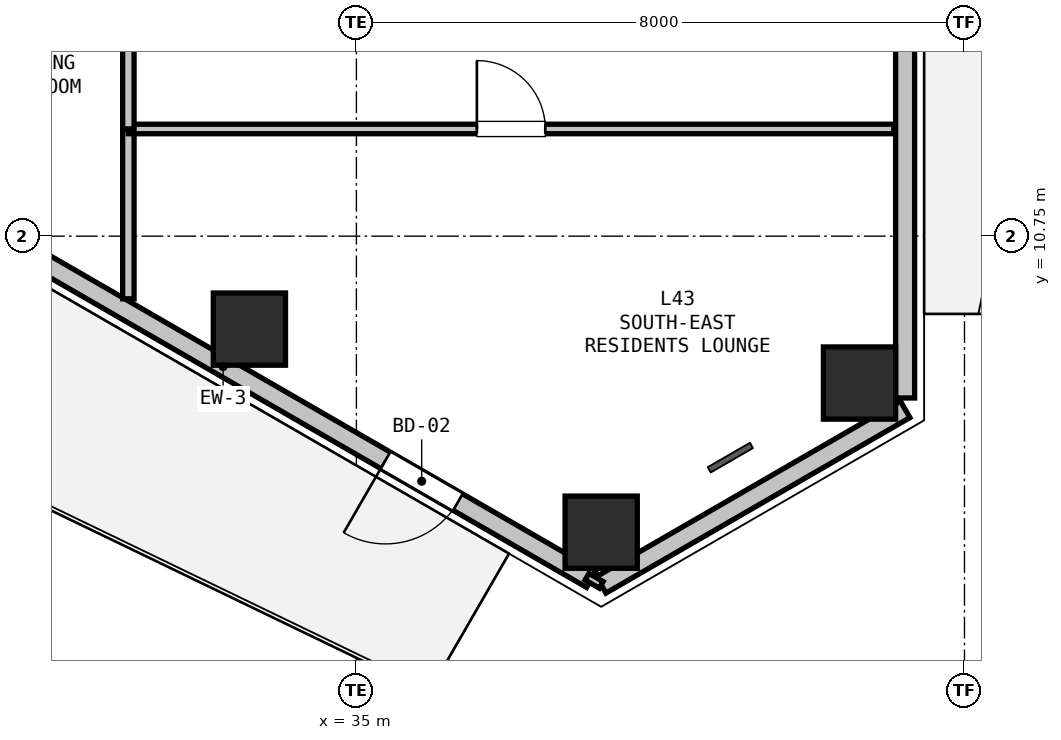
"""IFC4 building model, lengths in metres.
Left out: names, types, materials, properties, quantities, classifications, styles, units other than length and angle.
Written with IfcOpenShell. Run it as: python <this file> out.ifc"""

import sys

from ifc_helpers import new_model, si_unit, direction, frame, frame_2d, origin, origin_2d, place, context, subcontext, project, spatial, rectangle, hollow_rectangle, extrude, element, fill, save


model = new_model("IFC4")
c1 = context("Model", 3, precision=1e-05, world=origin(), true_north=direction((0.0, 1.0)))
c2 = subcontext(c1, "Body", "Model", "MODEL_VIEW")
j1 = project(units=[si_unit("LENGTHUNIT", "METRE"), si_unit("PLANEANGLEUNIT", "RADIAN")], contexts=[c1])
p1 = place(None, origin())
s1 = spatial("IfcSite", under=j1, at=p1, CompositionType="ELEMENT")
p2 = place(p1, origin())
s2 = spatial("IfcBuilding", under=s1, at=p2, CompositionType="ELEMENT")
p3 = place(p2, frame((0.0, 0.0, 154.2)))
s3 = spatial("IfcBuildingStorey", under=s2, at=p3, CompositionType="ELEMENT", Elevation=154.2)
for number, where, z_axis, x_axis in (
    (1, (41.619, 8.817, 0.0), (0.0, 0.0, 1.0), (1.0, 0.0, 0.0)),
    (2, (38.22, 6.855, 0.0), (0.0, 0.0, 1.0), (1.0, 0.0, 0.0)),
    (3, (33.593, 9.527, 0.0), (0.0, 0.0, 1.0), (1.0, 0.0, 0.0)),
):
    element("IfcColumn", number, at=place(p3, frame(where, z_axis=z_axis, x_axis=x_axis)), inside=s3, PredefinedType="COLUMN", context=c2, shape_type="SweptSolid", body=[
        extrude(hollow_rectangle(XDim=0.95, YDim=0.95, WallThickness=0.028, at=origin_2d()), origin(), (0.0, 0.0, 1.0), 3.3),
    ])
p4 = place(p3, frame((42.219, 8.471, 0.0), z_axis=(0.0, 0.0, 1.0), x_axis=(-0.866035021055, -0.499983342029, 0.0)))
e4 = element("IfcWall", 4, at=p4, inside=s3, PredefinedType="SOLIDWALL", context=c2, shape_type="SweptSolid", body=[
    extrude(rectangle(XDim=4.617, YDim=0.25, at=frame_2d((2.309, 0.0))), origin(), (0.0, 0.0, 1.0), 2.68),
])
p5 = place(p3, frame((42.219, 19.807, 0.0), z_axis=(0.0, 0.0, 1.0), x_axis=(0.0, -1.0, 0.0)))
e5 = element("IfcWall", 5, at=p5, inside=s3, PredefinedType="SOLIDWALL", context=c2, shape_type="SweptSolid", body=[
    extrude(rectangle(XDim=11.186, YDim=0.25, at=frame_2d((5.593, 0.0))), origin(), (0.0, 0.0, 1.0), 2.68),
])
p6 = place(p5, frame((2.796, 0.0, 0.9)))
e6 = element("IfcOpeningElement", 6, at=p6, cuts=e5, PredefinedType="OPENING", context=c2, shape_type="SweptSolid", body=[
    extrude(rectangle(XDim=1.2, YDim=1.5, at=frame_2d((0.6, 0.75))), frame((0.0, 0.135, 0.0), z_axis=(0.0, -1.0, 0.0), x_axis=(1.0, 0.0, 0.0)), (0.0, 0.0, 1.0), 0.27),
])
p7 = place(p3, frame((38.091, 6.237, 0.0), z_axis=(0.0, 0.0, 1.0), x_axis=(-0.86602239209, 0.500005216371, 0.0)))
e7 = element("IfcWall", 7, at=p7, inside=s3, PredefinedType="SOLIDWALL", context=c2, shape_type="SweptSolid", body=[
    extrude(rectangle(XDim=11.186, YDim=0.25, at=frame_2d((5.593, 0.0))), origin(), (0.0, 0.0, 1.0), 2.68),
])
p8 = place(p7, frame((2.027, 0.0, 0.0)))
e8 = element("IfcOpeningElement", 8, at=p8, cuts=e7, PredefinedType="OPENING", context=c2, shape_type="SweptSolid", body=[
    extrude(rectangle(XDim=1.1, YDim=2.1, at=frame_2d((0.55, 1.05))), frame((0.0, 0.135, 0.0), z_axis=(0.0, -1.0, 0.0), x_axis=(1.0, 0.0, 0.0)), (0.0, 0.0, 1.0), 0.27),
])
p9 = place(p7, frame((8.571, 0.0, 0.9)))
e9 = element("IfcOpeningElement", 9, at=p9, cuts=e7, PredefinedType="OPENING", context=c2, shape_type="SweptSolid", body=[
    extrude(rectangle(XDim=1.2, YDim=1.4, at=frame_2d((0.6, 0.7))), frame((0.0, 0.135, 0.0), z_axis=(0.0, -1.0, 0.0), x_axis=(1.0, 0.0, 0.0)), (0.0, 0.0, 1.0), 0.27),
])
p10 = place(p3, frame((32.0, 9.926, 0.0), z_axis=(0.0, 0.0, 1.0), x_axis=(0.0, 1.0, 0.0)))
e10 = element("IfcWall", 10, at=p10, inside=s3, PredefinedType="PARTITIONING", context=c2, shape_type="SweptSolid", body=[
    extrude(rectangle(XDim=2.234, YDim=0.15, at=frame_2d((1.117, 0.0))), origin(), (0.0, 0.0, 1.0), 2.365),
])
p11 = place(p3, frame((32.0, 12.16, 0.0), z_axis=(0.0, 0.0, 1.0), x_axis=(1.0, 0.0, 0.0)))
e11 = element("IfcWall", 11, at=p11, inside=s3, PredefinedType="PARTITIONING", context=c2, shape_type="SweptSolid", body=[
    extrude(rectangle(XDim=10.07, YDim=0.125, at=frame_2d((5.035, 0.0))), origin(), (0.0, 0.0, 1.0), 2.433),
])
p12 = place(p11, frame((4.585, 0.0, 0.0)))
e12 = element("IfcOpeningElement", 12, at=p12, cuts=e11, PredefinedType="OPENING", context=c2, shape_type="SweptSolid", body=[
    extrude(rectangle(XDim=0.9, YDim=2.1, at=frame_2d((0.45, 1.05))), frame((0.0, 0.073, 0.0), z_axis=(0.0, -1.0, 0.0), x_axis=(1.0, 0.0, 0.0)), (0.0, 0.0, 1.0), 0.145),
])
p13 = place(p3, frame((38.221, 6.162, 0.0), z_axis=(0.0, 0.0, 1.0), x_axis=(-0.865581379588, 0.500768285049, 0.0)))
e13 = element("IfcWall", 13, at=p13, inside=s3, PredefinedType="PARTITIONING", context=c2, shape_type="SweptSolid", body=[
    extrude(rectangle(XDim=0.216, YDim=0.1, at=frame_2d((0.108, 0.0))), origin(), (0.0, 0.0, 1.0), 3.06),
])
p14 = place(p3, frame((32.0, 12.16, 0.0), z_axis=(0.0, 0.0, 1.0), x_axis=(0.0, 1.0, 0.0)))
e14 = element("IfcWall", 14, at=p14, inside=s3, PredefinedType="PARTITIONING", context=c2, shape_type="SweptSolid", body=[
    extrude(rectangle(XDim=3.69, YDim=0.15, at=frame_2d((1.845, 0.0))), origin(), (0.0, 0.0, 1.0), 3.06),
])
p15 = place(p8, origin())
e15 = element("IfcDoor", 15, at=p15, inside=s3, OperationType="SINGLE_SWING_RIGHT", PredefinedType="DOOR", context=c2, shape_type="SweptSolid", body=[
    extrude(rectangle(XDim=1.1, YDim=2.1, at=frame_2d((0.55, 1.05))), frame((0.0, 0.025, 0.0), z_axis=(0.0, -1.0, 0.0), x_axis=(1.0, 0.0, 0.0)), (0.0, 0.0, 1.0), 0.05),
])
fill(e8, e15)
p16 = place(p12, origin())
e16 = element("IfcDoor", 16, at=p16, inside=s3, OperationType="SINGLE_SWING_LEFT", PredefinedType="DOOR", context=c2, shape_type="SweptSolid", body=[
    extrude(rectangle(XDim=0.9, YDim=2.1, at=frame_2d((0.45, 1.05))), frame((0.0, 0.025, 0.0), z_axis=(0.0, -1.0, 0.0), x_axis=(1.0, 0.0, 0.0)), (0.0, 0.0, 1.0), 0.05),
])
fill(e12, e16)
save(model, sys.argv[1])
